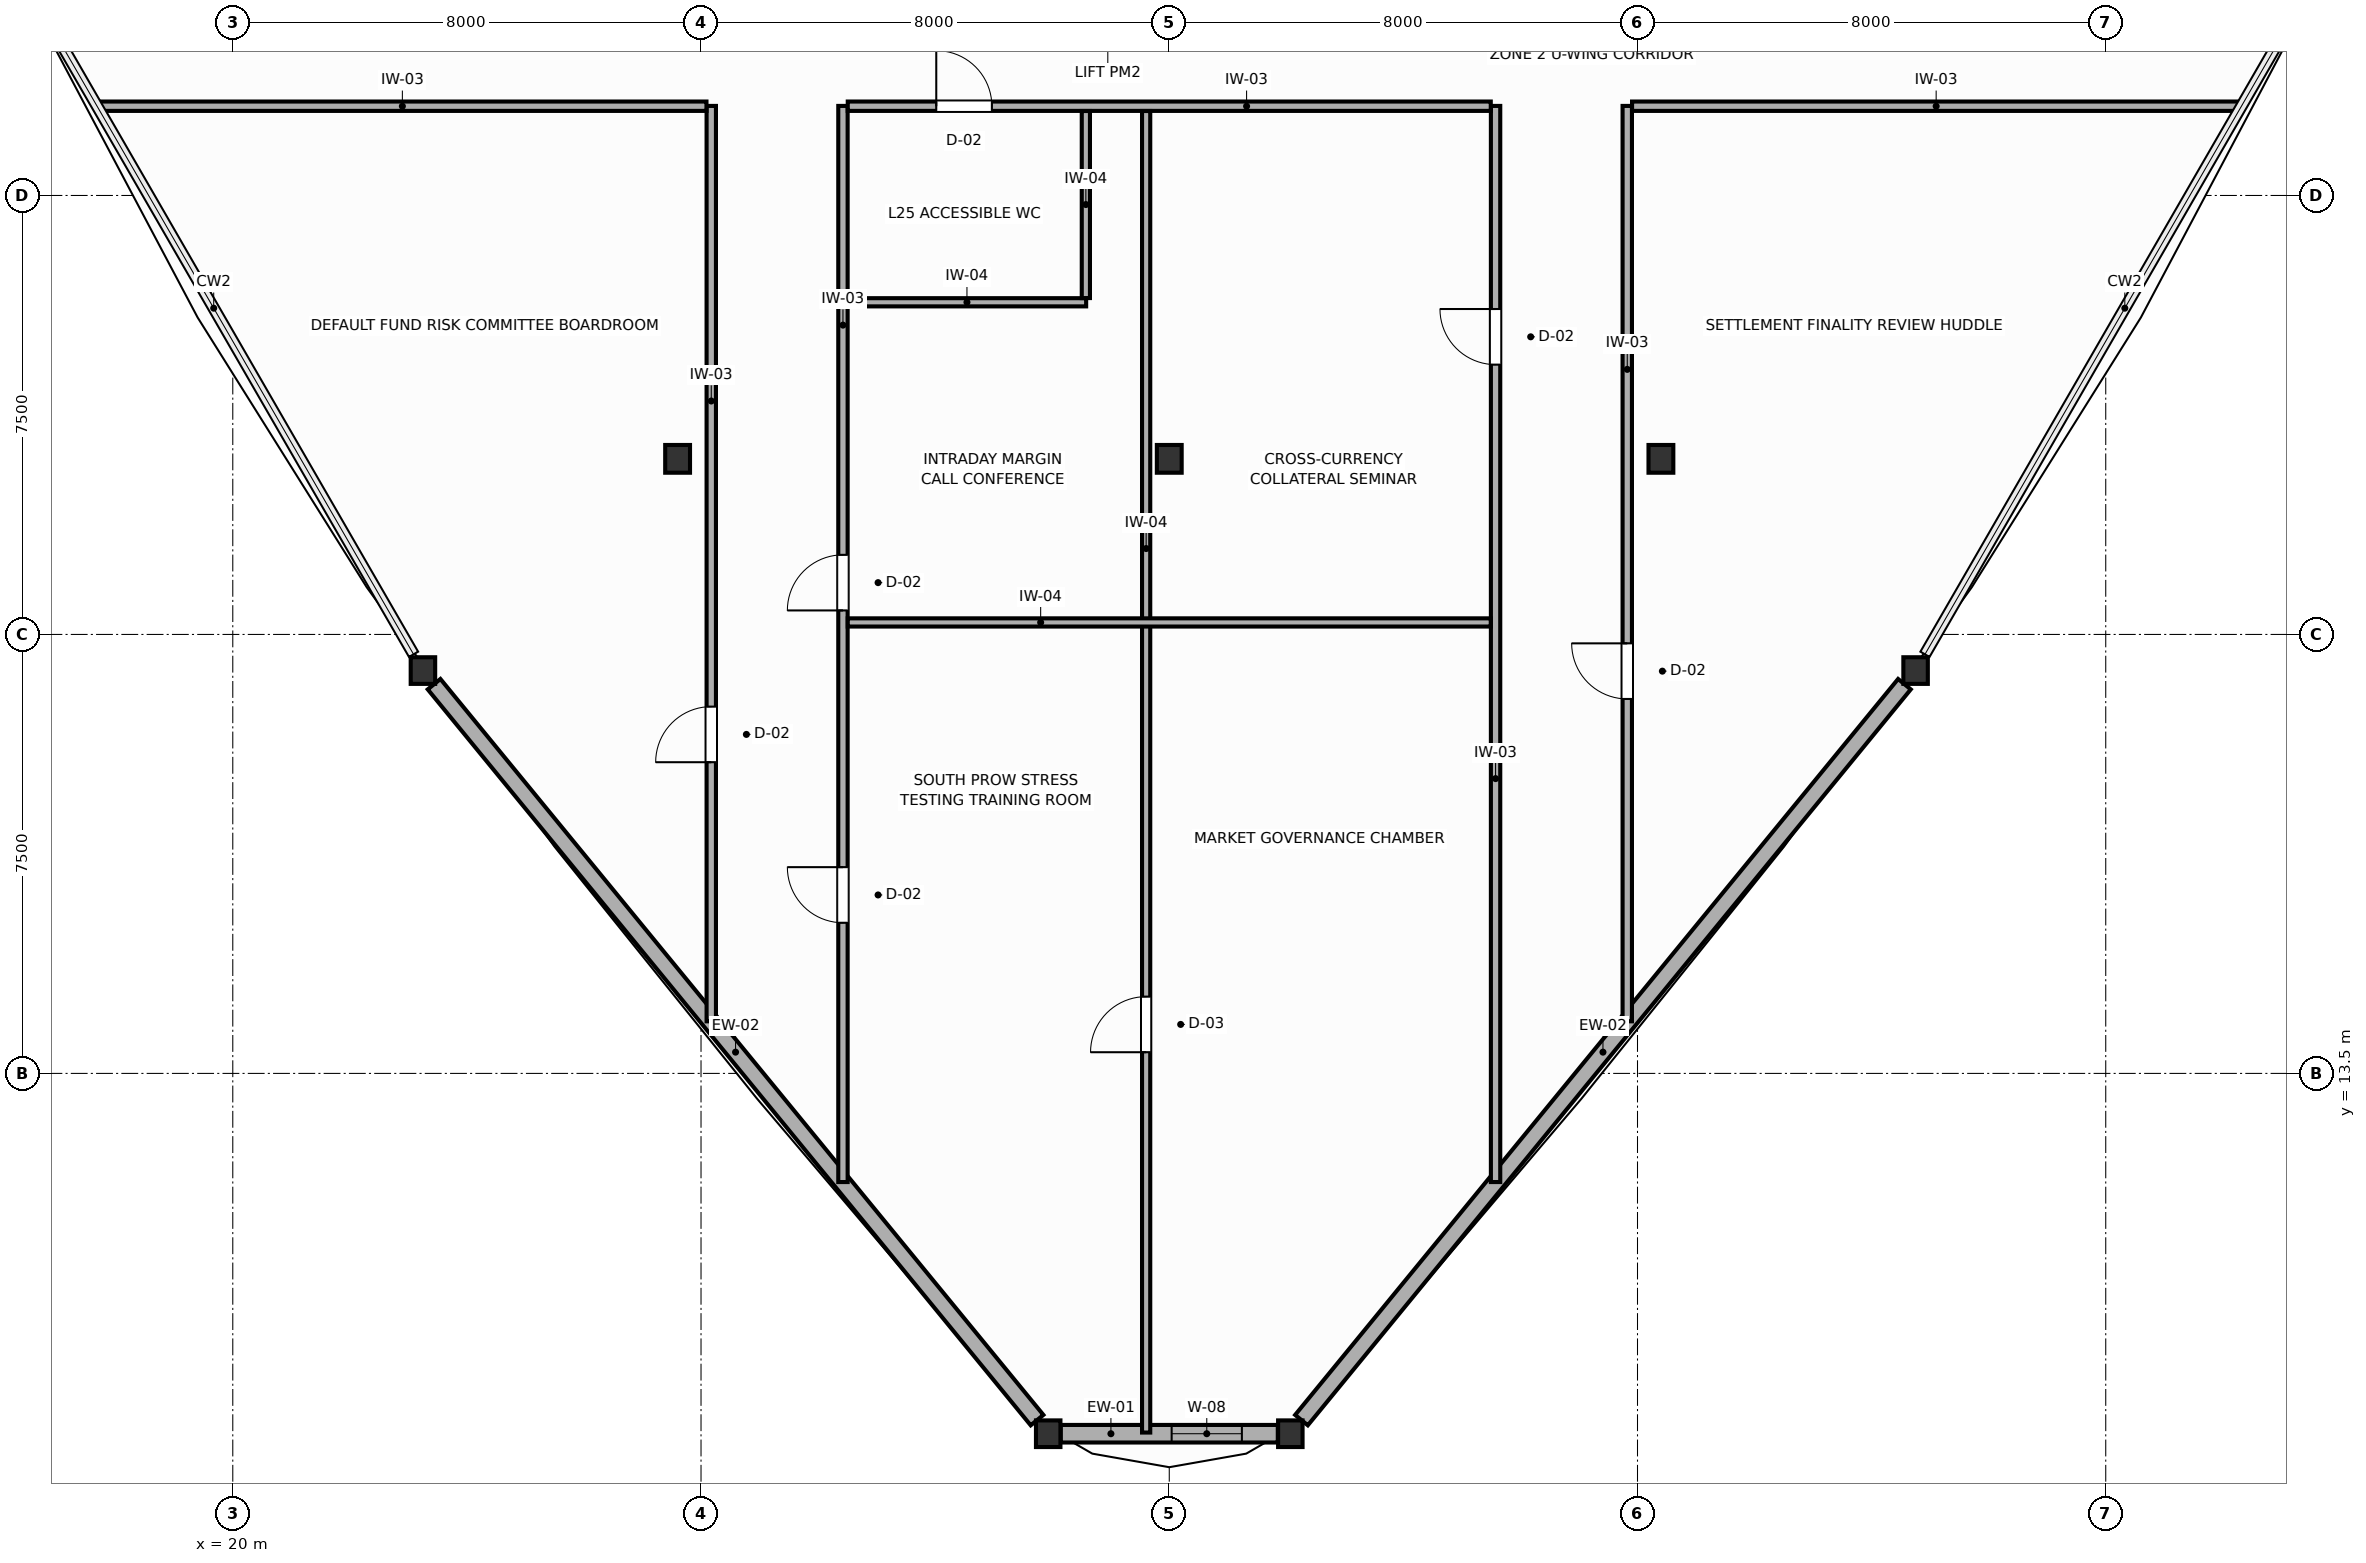
"""IFC4 building model, lengths in metres.
Left out: names, types, materials, properties, quantities, classifications, styles, units other than length and angle.
Written with IfcOpenShell. Run it as: python <this file> out.ifc"""

import sys

from ifc_helpers import new_model, si_unit, direction, frame, frame_2d, origin, origin_2d, place, context, subcontext, project, spatial, rectangle, i_section, extrude, source, transform, mapped, element, fill, save


model = new_model("IFC4")
c1 = context("Model", 3, precision=1e-05, world=origin(), true_north=direction((0.0, 1.0)))
c2 = subcontext(c1, "Body", "Model", "MODEL_VIEW")
j1 = project(units=[si_unit("LENGTHUNIT", "METRE"), si_unit("PLANEANGLEUNIT", "RADIAN")], contexts=[c1])
p1 = place(None, origin())
s1 = spatial("IfcSite", under=j1, at=p1, CompositionType="ELEMENT")
p2 = place(p1, origin())
s2 = spatial("IfcBuilding", under=s1, at=p2, CompositionType="ELEMENT")
p3 = place(p2, frame((0.0, 0.0, 102.6)))
s3 = spatial("IfcBuildingStorey", under=s2, at=p3, CompositionType="ELEMENT", Elevation=102.6)
m1 = source(origin(), c2, "Body", "SweptSolid", [
    extrude(i_section(OverallWidth=0.424, OverallDepth=0.474, WebThickness=0.045, FlangeThickness=0.072, FilletRadius=0.015, at=origin_2d()), origin(), (0.0, 0.0, 1.0), 3.6),
])
for number, where, z_axis, x_axis in (
    (1, (27.6, 24.0, 0.0), (0.0, 0.0, 1.0), (1.0, 0.0, 0.0)),
    (2, (44.4, 24.0, 0.0), (0.0, 0.0, 1.0), (1.0, 0.0, 0.0)),
    (3, (36.0, 24.0, 0.0), (0.0, 0.0, 1.0), (1.0, 0.0, 0.0)),
):
    element("IfcColumn", number, at=place(p3, frame(where, z_axis=z_axis, x_axis=x_axis)), inside=s3, PredefinedType="COLUMN", context=c2, shape_type="MappedRepresentation", body=[
        mapped(m1, transform((0.0, 0.0, 0.0), scale=1.0)),
    ])
m2 = source(origin(), c2, "Body", "SweptSolid", [
    extrude(i_section(OverallWidth=0.418, OverallDepth=0.455, WebThickness=0.039, FlangeThickness=0.063, FilletRadius=0.015, at=origin_2d()), origin(), (0.0, 0.0, 1.0), 3.6),
])
for number, where, z_axis, x_axis in (
    (4, (23.249, 20.383, 0.0), (0.0, 0.0, 1.0), (1.0, 0.0, 0.0)),
    (5, (33.932, 7.344, 0.0), (0.0, 0.0, 1.0), (1.0, 0.0, 0.0)),
    (6, (38.068, 7.344, 0.0), (0.0, 0.0, 1.0), (1.0, 0.0, 0.0)),
    (7, (48.751, 20.383, 0.0), (0.0, 0.0, 1.0), (1.0, 0.0, 0.0)),
):
    element("IfcColumn", number, at=place(p3, frame(where, z_axis=z_axis, x_axis=x_axis)), inside=s3, PredefinedType="COLUMN", context=c2, shape_type="MappedRepresentation", body=[
        mapped(m2, transform((0.0, 0.0, 0.0), scale=1.0)),
    ])
p4 = place(p3, frame((23.439, 20.15, 0.0), z_axis=(0.0, 0.0, 1.0), x_axis=(0.633768446385, -0.773522822137, 0.0)))
e8 = element("IfcWall", 8, at=p4, inside=s3, PredefinedType="SOLIDWALL", context=c2, shape_type="SweptSolid", body=[
    extrude(rectangle(XDim=16.255, YDim=0.28, at=frame_2d((8.127, 0.0))), origin(), (0.0, 0.0, 1.0), 3.0),
])
p5 = place(p3, frame((34.146, 7.344, 0.0), z_axis=(0.0, 0.0, 1.0), x_axis=(1.0, 0.0, 0.0)))
e9 = element("IfcWall", 9, at=p5, inside=s3, PredefinedType="SOLIDWALL", context=c2, shape_type="SweptSolid", body=[
    extrude(rectangle(XDim=3.709, YDim=0.3, at=frame_2d((1.854, 0.0))), origin(), (0.0, 0.0, 1.0), 3.0),
])
p6 = place(p5, frame((1.895, 0.0, 0.75)))
e10 = element("IfcOpeningElement", 10, at=p6, cuts=e9, PredefinedType="OPENING", context=c2, shape_type="SweptSolid", body=[
    extrude(rectangle(XDim=1.2, YDim=1.75, at=frame_2d((0.6, 0.875))), frame((0.0, 0.16, 0.0), z_axis=(0.0, -1.0, 0.0), x_axis=(1.0, 0.0, 0.0)), (0.0, 0.0, 1.0), 0.32),
])
p7 = place(p3, frame((38.259, 7.576, 0.0), z_axis=(0.0, 0.0, 1.0), x_axis=(0.633768446385, 0.773522822137, 0.0)))
e11 = element("IfcWall", 11, at=p7, inside=s3, PredefinedType="SOLIDWALL", context=c2, shape_type="SweptSolid", body=[
    extrude(rectangle(XDim=16.255, YDim=0.28, at=frame_2d((8.127, 0.0))), origin(), (0.0, 0.0, 1.0), 3.0),
])
p8 = place(p3, frame((30.425, 11.644, 0.0), z_axis=(0.0, 0.0, 1.0), x_axis=(0.0, 1.0, 0.0)))
e12 = element("IfcWall", 12, at=p8, inside=s3, PredefinedType="PARTITIONING", context=c2, shape_type="SweptSolid", body=[
    extrude(rectangle(XDim=18.386, YDim=0.16, at=frame_2d((9.193, 0.0))), origin(), (0.0, 0.0, 1.0), 3.4),
])
p9 = place(p8, frame((4.43, 0.0, 0.0)))
e13 = element("IfcOpeningElement", 13, at=p9, cuts=e12, PredefinedType="OPENING", context=c2, shape_type="SweptSolid", body=[
    extrude(rectangle(XDim=0.95, YDim=2.05, at=frame_2d((0.475, 1.025))), frame((0.0, 0.09, 0.0), z_axis=(0.0, -1.0, 0.0), x_axis=(1.0, 0.0, 0.0)), (0.0, 0.0, 1.0), 0.18),
])
p10 = place(p8, frame((9.766, 0.0, 0.0)))
e14 = element("IfcOpeningElement", 14, at=p10, cuts=e12, PredefinedType="OPENING", context=c2, shape_type="SweptSolid", body=[
    extrude(rectangle(XDim=0.95, YDim=2.05, at=frame_2d((0.475, 1.025))), frame((0.0, 0.09, 0.0), z_axis=(0.0, -1.0, 0.0), x_axis=(1.0, 0.0, 0.0)), (0.0, 0.0, 1.0), 0.18),
])
p11 = place(p3, frame((41.575, 11.644, 0.0), z_axis=(0.0, 0.0, 1.0), x_axis=(0.0, 1.0, 0.0)))
e15 = element("IfcWall", 15, at=p11, inside=s3, PredefinedType="PARTITIONING", context=c2, shape_type="SweptSolid", body=[
    extrude(rectangle(XDim=18.386, YDim=0.16, at=frame_2d((9.193, 0.0))), origin(), (0.0, 0.0, 1.0), 3.4),
])
p12 = place(p11, frame((13.966, 0.0, 0.0)))
e16 = element("IfcOpeningElement", 16, at=p12, cuts=e15, PredefinedType="OPENING", context=c2, shape_type="SweptSolid", body=[
    extrude(rectangle(XDim=0.95, YDim=2.05, at=frame_2d((0.475, 1.025))), frame((0.0, 0.09, 0.0), z_axis=(0.0, -1.0, 0.0), x_axis=(1.0, 0.0, 0.0)), (0.0, 0.0, 1.0), 0.18),
])
p13 = place(p3, frame((28.175, 14.39, 0.0), z_axis=(0.0, 0.0, 1.0), x_axis=(0.0, 1.0, 0.0)))
e17 = element("IfcWall", 17, at=p13, inside=s3, PredefinedType="PARTITIONING", context=c2, shape_type="SweptSolid", body=[
    extrude(rectangle(XDim=15.64, YDim=0.16, at=frame_2d((7.82, 0.0))), origin(), (0.0, 0.0, 1.0), 3.4),
])
p14 = place(p13, frame((4.427, 0.0, 0.0)))
e18 = element("IfcOpeningElement", 18, at=p14, cuts=e17, PredefinedType="OPENING", context=c2, shape_type="SweptSolid", body=[
    extrude(rectangle(XDim=0.95, YDim=2.05, at=frame_2d((0.475, 1.025))), frame((0.0, 0.09, 0.0), z_axis=(0.0, -1.0, 0.0), x_axis=(1.0, 0.0, 0.0)), (0.0, 0.0, 1.0), 0.18),
])
p15 = place(p3, frame((43.825, 14.39, 0.0), z_axis=(0.0, 0.0, 1.0), x_axis=(0.0, 1.0, 0.0)))
e19 = element("IfcWall", 19, at=p15, inside=s3, PredefinedType="PARTITIONING", context=c2, shape_type="SweptSolid", body=[
    extrude(rectangle(XDim=15.64, YDim=0.16, at=frame_2d((7.82, 0.0))), origin(), (0.0, 0.0, 1.0), 3.0),
])
p16 = place(p15, frame((5.508, 0.0, 0.0)))
e20 = element("IfcOpeningElement", 20, at=p16, cuts=e19, PredefinedType="OPENING", context=c2, shape_type="SweptSolid", body=[
    extrude(rectangle(XDim=0.95, YDim=2.05, at=frame_2d((0.475, 1.025))), frame((0.0, 0.09, 0.0), z_axis=(0.0, -1.0, 0.0), x_axis=(1.0, 0.0, 0.0)), (0.0, 0.0, 1.0), 0.18),
])
p17 = place(p3, frame((30.507, 30.025, 0.0), z_axis=(0.0, 0.0, 1.0), x_axis=(1.0, 0.0, 0.0)))
e21 = element("IfcWall", 21, at=p17, inside=s3, PredefinedType="PARTITIONING", context=c2, shape_type="SweptSolid", body=[
    extrude(rectangle(XDim=10.986, YDim=0.16, at=frame_2d((5.493, 0.0))), origin(), (0.0, 0.0, 1.0), 3.4),
])
p18 = place(p17, frame((1.512, 0.0, 0.0)))
e22 = element("IfcOpeningElement", 22, at=p18, cuts=e21, PredefinedType="OPENING", context=c2, shape_type="SweptSolid", body=[
    extrude(rectangle(XDim=0.95, YDim=2.05, at=frame_2d((0.475, 1.025))), frame((0.0, 0.09, 0.0), z_axis=(0.0, -1.0, 0.0), x_axis=(1.0, 0.0, 0.0)), (0.0, 0.0, 1.0), 0.18),
])
for number, where, z_axis, x_axis in (
    (23, (17.702, 30.025, 0.0), (0.0, 0.0, 1.0), (1.0, 0.0, 0.0)),
    (24, (43.907, 30.025, 0.0), (0.0, 0.0, 1.0), (1.0, 0.0, 0.0)),
):
    element("IfcWall", number, at=place(p3, frame(where, z_axis=z_axis, x_axis=x_axis)), inside=s3, PredefinedType="PARTITIONING", context=c2, shape_type="SweptSolid", body=[
        extrude(rectangle(XDim=10.391, YDim=0.16, at=frame_2d((5.196, 0.0))), origin(), (0.0, 0.0, 1.0), 3.4),
    ])
p19 = place(p3, frame((35.605, 7.364, 0.0), z_axis=(0.0, 0.0, 1.0), x_axis=(0.0, 1.0, 0.0)))
e25 = element("IfcWall", 25, at=p19, inside=s3, PredefinedType="PARTITIONING", context=c2, shape_type="SweptSolid", body=[
    extrude(rectangle(XDim=22.579, YDim=0.14, at=frame_2d((11.29, 0.0))), origin(), (0.0, 0.0, 1.0), 2.95),
])
p20 = place(p19, frame((6.498, 0.0, 0.0)))
e26 = element("IfcOpeningElement", 26, at=p20, cuts=e25, PredefinedType="OPENING", context=c2, shape_type="SweptSolid", body=[
    extrude(rectangle(XDim=0.95, YDim=2.05, at=frame_2d((0.475, 1.025))), frame((0.0, 0.08, 0.0), z_axis=(0.0, -1.0, 0.0), x_axis=(1.0, 0.0, 0.0)), (0.0, 0.0, 1.0), 0.16),
])
p21 = place(p3, frame((30.507, 21.205, 0.0), z_axis=(0.0, 0.0, 1.0), x_axis=(1.0, 0.0, 0.0)))
e27 = element("IfcWall", 27, at=p21, inside=s3, PredefinedType="PARTITIONING", context=c2, shape_type="SweptSolid", body=[
    extrude(rectangle(XDim=10.986, YDim=0.14, at=frame_2d((5.493, 0.0))), origin(), (0.0, 0.0, 1.0), 3.4),
])
p22 = place(p3, frame((30.507, 26.675, 0.0), z_axis=(0.0, 0.0, 1.0), x_axis=(1.0, 0.0, 0.0)))
e28 = element("IfcWall", 28, at=p22, inside=s3, PredefinedType="PARTITIONING", context=c2, shape_type="SweptSolid", body=[
    extrude(rectangle(XDim=4.073, YDim=0.14, at=frame_2d((2.037, 0.0))), origin(), (0.0, 0.0, 1.0), 3.4),
])
p23 = place(p3, frame((34.575, 26.747, 0.0), z_axis=(0.0, 0.0, 1.0), x_axis=(0.0, 1.0, 0.0)))
e29 = element("IfcWall", 29, at=p23, inside=s3, PredefinedType="PARTITIONING", context=c2, shape_type="SweptSolid", body=[
    extrude(rectangle(XDim=3.196, YDim=0.14, at=frame_2d((1.598, 0.0))), origin(), (0.0, 0.0, 1.0), 3.4),
])
p24 = place(p6, origin())
e30 = element("IfcWindow", 30, at=p24, inside=s3, PartitioningType="SINGLE_PANEL", PredefinedType="WINDOW", context=c2, shape_type="SweptSolid", body=[
    extrude(rectangle(XDim=1.2, YDim=1.75, at=frame_2d((0.6, 0.875))), frame((0.0, 0.03, 0.0), z_axis=(0.0, -1.0, 0.0), x_axis=(1.0, 0.0, 0.0)), (0.0, 0.0, 1.0), 0.06),
])
fill(e10, e30)
p25 = place(p9, origin())
e31 = element("IfcDoor", 31, at=p25, inside=s3, OperationType="SINGLE_SWING_RIGHT", PredefinedType="DOOR", context=c2, shape_type="SweptSolid", body=[
    extrude(rectangle(XDim=0.95, YDim=2.05, at=frame_2d((0.475, 1.025))), frame((0.0, 0.025, 0.0), z_axis=(0.0, -1.0, 0.0), x_axis=(1.0, 0.0, 0.0)), (0.0, 0.0, 1.0), 0.05),
])
fill(e13, e31)
p26 = place(p10, origin())
e32 = element("IfcDoor", 32, at=p26, inside=s3, OperationType="SINGLE_SWING_LEFT", PredefinedType="DOOR", context=c2, shape_type="SweptSolid", body=[
    extrude(rectangle(XDim=0.95, YDim=2.05, at=frame_2d((0.475, 1.025))), frame((0.0, 0.025, 0.0), z_axis=(0.0, -1.0, 0.0), x_axis=(1.0, 0.0, 0.0)), (0.0, 0.0, 1.0), 0.05),
])
fill(e14, e32)
p27 = place(p12, origin())
e33 = element("IfcDoor", 33, at=p27, inside=s3, OperationType="SINGLE_SWING_RIGHT", PredefinedType="DOOR", context=c2, shape_type="SweptSolid", body=[
    extrude(rectangle(XDim=0.95, YDim=2.05, at=frame_2d((0.475, 1.025))), frame((0.0, 0.025, 0.0), z_axis=(0.0, -1.0, 0.0), x_axis=(1.0, 0.0, 0.0)), (0.0, 0.0, 1.0), 0.05),
])
fill(e16, e33)
p28 = place(p14, origin())
e34 = element("IfcDoor", 34, at=p28, inside=s3, OperationType="SINGLE_SWING_LEFT", PredefinedType="DOOR", context=c2, shape_type="SweptSolid", body=[
    extrude(rectangle(XDim=0.95, YDim=2.05, at=frame_2d((0.475, 1.025))), frame((0.0, 0.025, 0.0), z_axis=(0.0, -1.0, 0.0), x_axis=(1.0, 0.0, 0.0)), (0.0, 0.0, 1.0), 0.05),
])
fill(e18, e34)
p29 = place(p16, origin())
e35 = element("IfcDoor", 35, at=p29, inside=s3, OperationType="SINGLE_SWING_RIGHT", PredefinedType="DOOR", context=c2, shape_type="SweptSolid", body=[
    extrude(rectangle(XDim=0.95, YDim=2.05, at=frame_2d((0.475, 1.025))), frame((0.0, 0.025, 0.0), z_axis=(0.0, -1.0, 0.0), x_axis=(1.0, 0.0, 0.0)), (0.0, 0.0, 1.0), 0.05),
])
fill(e20, e35)
p30 = place(p18, origin())
e36 = element("IfcDoor", 36, at=p30, inside=s3, OperationType="SINGLE_SWING_LEFT", PredefinedType="DOOR", context=c2, shape_type="SweptSolid", body=[
    extrude(rectangle(XDim=0.95, YDim=2.05, at=frame_2d((0.475, 1.025))), frame((0.0, 0.025, 0.0), z_axis=(0.0, -1.0, 0.0), x_axis=(1.0, 0.0, 0.0)), (0.0, 0.0, 1.0), 0.05),
])
fill(e22, e36)
p31 = place(p20, origin())
e37 = element("IfcDoor", 37, at=p31, inside=s3, OperationType="SINGLE_SWING_LEFT", PredefinedType="DOOR", context=c2, shape_type="SweptSolid", body=[
    extrude(rectangle(XDim=0.95, YDim=2.05, at=frame_2d((0.475, 1.025))), frame((0.0, 0.025, 0.0), z_axis=(0.0, -1.0, 0.0), x_axis=(1.0, 0.0, 0.0)), (0.0, 0.0, 1.0), 0.05),
])
fill(e26, e37)
save(model, sys.argv[1])
